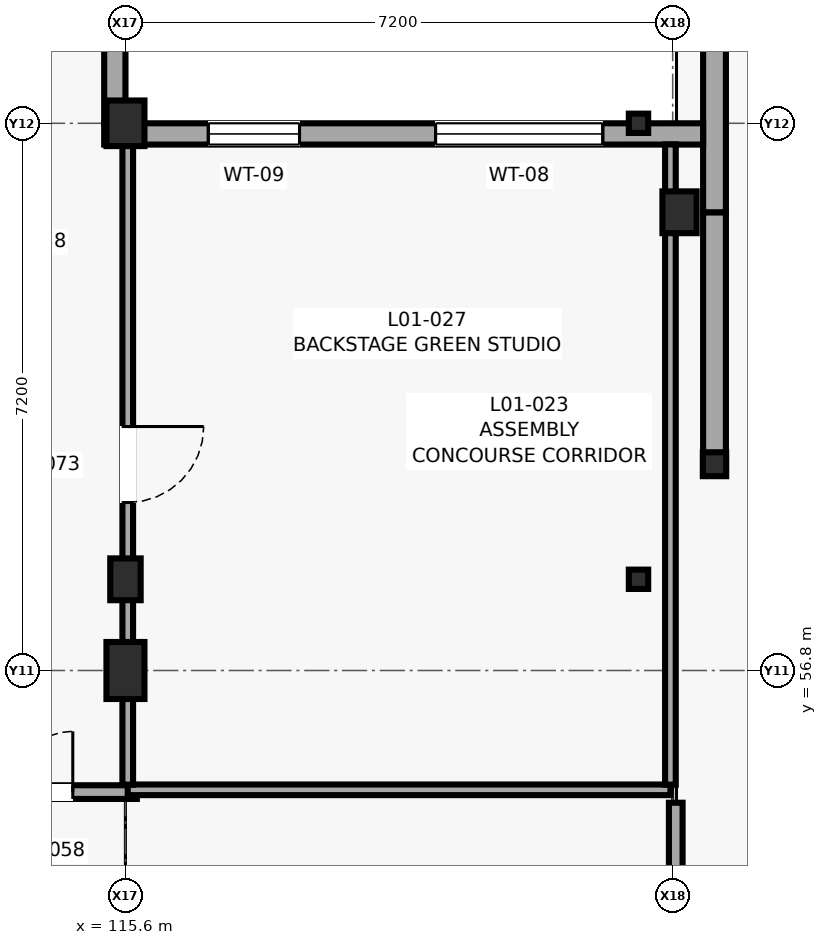
"""IFC4 building model, lengths in metres.
Left out: names, types, materials, properties, quantities, classifications, styles, units other than length and angle.
Written with IfcOpenShell. Run it as: python <this file> out.ifc"""

import sys

from ifc_helpers import new_model, si_unit, direction, frame, frame_2d, origin, origin_2d, place, context, subcontext, project, spatial, rectangle, i_section, extrude, element, fill, save


model = new_model("IFC4")
c1 = context("Model", 3, precision=1e-05, world=origin(), true_north=direction((0.0, 1.0)))
c2 = subcontext(c1, "Body", "Model", "MODEL_VIEW")
j1 = project(units=[si_unit("LENGTHUNIT", "METRE"), si_unit("PLANEANGLEUNIT", "RADIAN")], contexts=[c1])
p1 = place(None, origin())
s1 = spatial("IfcSite", under=j1, at=p1, CompositionType="ELEMENT")
p2 = place(p1, origin())
s2 = spatial("IfcBuilding", under=s1, at=p2, CompositionType="ELEMENT")
p3 = place(p2, frame((0.0, 0.0, 4.2)))
s3 = spatial("IfcBuildingStorey", under=s2, at=p3, CompositionType="ELEMENT", Elevation=4.2)
p4 = place(p3, frame((115.6, 56.8, 0.0), z_axis=(0.0, 0.0, 1.0), x_axis=(1.0, 0.0, 0.0)))
e1 = element("IfcColumn", 1, at=p4, inside=s3, PredefinedType="COLUMN", context=c2, shape_type="SweptSolid", body=[
    extrude(rectangle(XDim=0.5, YDim=0.75, at=origin_2d()), origin(), (0.0, 0.0, 1.0), 4.0),
])
p5 = place(p3, frame((115.6, 58.0, 0.0), z_axis=(0.0, 0.0, 1.0), x_axis=(1.0, 0.0, 0.0)))
e2 = element("IfcColumn", 2, at=p5, inside=s3, PredefinedType="COLUMN", context=c2, shape_type="SweptSolid", body=[
    extrude(rectangle(XDim=0.4, YDim=0.55, at=origin_2d()), origin(), (0.0, 0.0, 1.0), 4.0),
])
p6 = place(p3, frame((115.6, 64.0, 0.0), z_axis=(0.0, 0.0, 1.0), x_axis=(1.0, 0.0, 0.0)))
e3 = element("IfcColumn", 3, at=p6, inside=s3, PredefinedType="PILASTER", context=c2, shape_type="SweptSolid", body=[
    extrude(rectangle(XDim=0.5, YDim=0.6, at=origin_2d()), origin(), (0.0, 0.0, 1.0), 4.0),
])
for number, where, z_axis, x_axis in (
    (4, (122.35, 58.0, 0.0), (0.0, 0.0, 1.0), (1.0, 0.0, 0.0)),
    (5, (122.35, 64.0, 0.0), (0.0, 0.0, 1.0), (1.0, 0.0, 0.0)),
):
    element("IfcColumn", number, at=place(p3, frame(where, z_axis=z_axis, x_axis=x_axis)), inside=s3, PredefinedType="COLUMN", context=c2, shape_type="SweptSolid", body=[
        extrude(i_section(OverallWidth=0.255, OverallDepth=0.254, WebThickness=0.009, FlangeThickness=0.014, FilletRadius=0.013, at=origin_2d()), origin(), (0.0, 0.0, 1.0), 4.0),
    ])
p7 = place(p3, frame((122.89, 62.829, 0.0), z_axis=(0.0, 0.0, 1.0), x_axis=(1.0, 0.0, 0.0)))
e6 = element("IfcColumn", 6, at=p7, inside=s3, PredefinedType="PILASTER", context=c2, shape_type="SweptSolid", body=[
    extrude(rectangle(XDim=0.45, YDim=0.55, at=origin_2d()), origin(), (0.0, 0.0, 1.0), 4.0),
])
p8 = place(p3, frame((123.35, 59.514, 0.0), z_axis=(0.0, 0.0, 1.0), x_axis=(1.0, 0.0, 0.0)))
e7 = element("IfcColumn", 7, at=p8, inside=s3, PredefinedType="COLUMN", context=c2, shape_type="SweptSolid", body=[
    extrude(i_section(OverallWidth=0.307, OverallDepth=0.314, WebThickness=0.012, FlangeThickness=0.019, FilletRadius=0.015, at=origin_2d()), origin(), (0.0, 0.0, 1.0), 4.0),
])
p9 = place(p3, frame((123.35, 62.829, 0.0), z_axis=(0.0, 0.0, 1.0), x_axis=(0.0, -1.0, 0.0)))
e8 = element("IfcWall", 8, at=p9, inside=s3, PredefinedType="SOLIDWALL", context=c2, shape_type="SweptSolid", body=[
    extrude(rectangle(XDim=3.315, YDim=0.3, at=frame_2d((1.658, 0.0))), origin(), (0.0, 0.0, 1.0), 3.48),
])
p10 = place(p3, frame((123.35, 66.143, 0.0), z_axis=(0.0, 0.0, 1.0), x_axis=(0.0, -1.0, 0.0)))
e9 = element("IfcWall", 9, at=p10, inside=s3, PredefinedType="SOLIDWALL", context=c2, shape_type="SweptSolid", body=[
    extrude(rectangle(XDim=3.314, YDim=0.3, at=frame_2d((1.657, 0.0))), origin(), (0.0, 0.0, 1.0), 3.48),
])
p11 = place(p3, frame((123.2, 63.86, 0.0), z_axis=(0.0, 0.0, 1.0), x_axis=(-1.0, 0.0, 0.0)))
e10 = element("IfcWall", 10, at=p11, inside=s3, PredefinedType="SOLIDWALL", context=c2, shape_type="SweptSolid", body=[
    extrude(rectangle(XDim=7.88, YDim=0.28, at=frame_2d((3.94, 0.0))), origin(), (0.0, 0.0, 1.0), 3.16),
])
p12 = place(p11, frame((1.32, 0.0, 1.05)))
e11 = element("IfcOpeningElement", 11, at=p12, cuts=e10, PredefinedType="OPENING", context=c2, shape_type="SweptSolid", body=[
    extrude(rectangle(XDim=2.2, YDim=1.35, at=frame_2d((1.1, 0.675))), frame((0.0, 0.15, 0.0), z_axis=(0.0, -1.0, 0.0), x_axis=(1.0, 0.0, 0.0)), (0.0, 0.0, 1.0), 0.3),
])
p13 = place(p11, frame((5.31, 0.0, 1.05)))
e12 = element("IfcOpeningElement", 12, at=p13, cuts=e10, PredefinedType="OPENING", context=c2, shape_type="SweptSolid", body=[
    extrude(rectangle(XDim=1.2, YDim=0.9, at=frame_2d((0.6, 0.45))), frame((0.0, 0.15, 0.0), z_axis=(0.0, -1.0, 0.0), x_axis=(1.0, 0.0, 0.0)), (0.0, 0.0, 1.0), 0.3),
])
p14 = place(p3, frame((115.46, 64.0, 0.0), z_axis=(0.0, 0.0, 1.0), x_axis=(0.0, 1.0, 0.0)))
e13 = element("IfcWall", 13, at=p14, inside=s3, PredefinedType="SOLIDWALL", context=c2, shape_type="SweptSolid", body=[
    extrude(rectangle(XDim=7.6, YDim=0.28, at=frame_2d((3.8, 0.0))), origin(), (0.0, 0.0, 1.0), 3.275),
])
p15 = place(p14, frame((1.45, 0.0, 1.05)))
e14 = element("IfcOpeningElement", 14, at=p15, cuts=e13, PredefinedType="OPENING", context=c2, shape_type="SweptSolid", body=[
    extrude(rectangle(XDim=0.9, YDim=0.9, at=frame_2d((0.45, 0.45))), frame((0.0, 0.15, 0.0), z_axis=(0.0, -1.0, 0.0), x_axis=(1.0, 0.0, 0.0)), (0.0, 0.0, 1.0), 0.3),
])
p16 = place(p14, frame((5.475, 0.0, 1.05)))
e15 = element("IfcOpeningElement", 15, at=p16, cuts=e13, PredefinedType="OPENING", context=c2, shape_type="SweptSolid", body=[
    extrude(rectangle(XDim=1.35, YDim=1.2, at=frame_2d((0.675, 0.6))), frame((0.0, 0.15, 0.0), z_axis=(0.0, -1.0, 0.0), x_axis=(1.0, 0.0, 0.0)), (0.0, 0.0, 1.0), 0.3),
])
p17 = place(p3, frame((122.84, 50.678, 0.0), z_axis=(0.0, 0.0, 1.0), x_axis=(0.0, 1.0, 0.0)))
e16 = element("IfcWall", 16, at=p17, inside=s3, PredefinedType="PARTITIONING", context=c2, shape_type="SweptSolid", body=[
    extrude(rectangle(XDim=4.382, YDim=0.18, at=frame_2d((2.191, 0.0))), origin(), (0.0, 0.0, 1.0), 3.78),
])
p18 = place(p17, frame((0.9, 0.0, 0.0)))
e17 = element("IfcOpeningElement", 17, at=p18, cuts=e16, PredefinedType="OPENING", context=c2, shape_type="SweptSolid", body=[
    extrude(rectangle(XDim=1.6, YDim=2.25, at=frame_2d((0.8, 1.125))), frame((0.0, 0.1, 0.0), z_axis=(0.0, -1.0, 0.0), x_axis=(1.0, 0.0, 0.0)), (0.0, 0.0, 1.0), 0.2),
])
p19 = place(p3, frame((112.853, 55.2, 0.0), z_axis=(0.0, 0.0, 1.0), x_axis=(1.0, 0.0, 0.0)))
e18 = element("IfcWall", 18, at=p19, inside=s3, PredefinedType="PARTITIONING", context=c2, shape_type="SweptSolid", body=[
    extrude(rectangle(XDim=2.897, YDim=0.18, at=frame_2d((1.448, 0.0))), origin(), (0.0, 0.0, 1.0), 3.78),
])
p20 = place(p19, frame((0.454, 0.0, 0.0)))
e19 = element("IfcOpeningElement", 19, at=p20, cuts=e18, PredefinedType="OPENING", context=c2, shape_type="SweptSolid", body=[
    extrude(rectangle(XDim=1.6, YDim=2.25, at=frame_2d((0.8, 1.125))), frame((0.0, 0.1, 0.0), z_axis=(0.0, -1.0, 0.0), x_axis=(1.0, 0.0, 0.0)), (0.0, 0.0, 1.0), 0.2),
])
p21 = place(p3, frame((115.63, 55.23, 0.0), z_axis=(0.0, 0.0, 1.0), x_axis=(1.0, 0.0, 0.0)))
e20 = element("IfcWall", 20, at=p21, inside=s3, PredefinedType="PARTITIONING", context=c2, shape_type="SweptSolid", body=[
    extrude(rectangle(XDim=7.14, YDim=0.14, at=frame_2d((3.57, 0.0))), origin(), (0.0, 0.0, 1.0), 3.76),
])
p22 = place(p3, frame((122.77, 55.298, 0.0), z_axis=(0.0, 0.0, 1.0), x_axis=(0.0, 1.0, 0.0)))
e21 = element("IfcWall", 21, at=p22, inside=s3, PredefinedType="PARTITIONING", context=c2, shape_type="SweptSolid", body=[
    extrude(rectangle(XDim=8.424, YDim=0.14, at=frame_2d((4.212, 0.0))), origin(), (0.0, 0.0, 1.0), 3.76),
])
p23 = place(p3, frame((115.63, 63.722, 0.0), z_axis=(0.0, 0.0, 1.0), x_axis=(0.0, -1.0, 0.0)))
e22 = element("IfcWall", 22, at=p23, inside=s3, PredefinedType="PARTITIONING", context=c2, shape_type="SweptSolid", body=[
    extrude(rectangle(XDim=8.424, YDim=0.14, at=frame_2d((4.212, 0.0))), origin(), (0.0, 0.0, 1.0), 3.225),
])
p24 = place(p23, frame((3.712, 0.0, 0.0)))
e23 = element("IfcOpeningElement", 23, at=p24, cuts=e22, PredefinedType="OPENING", context=c2, shape_type="SweptSolid", body=[
    extrude(rectangle(XDim=1.0, YDim=2.1, at=frame_2d((0.5, 1.05))), frame((0.0, 0.08, 0.0), z_axis=(0.0, -1.0, 0.0), x_axis=(1.0, 0.0, 0.0)), (0.0, 0.0, 1.0), 0.16),
])
p25 = place(p12, origin())
e24 = element("IfcWindow", 24, at=p25, inside=s3, PartitioningType="SINGLE_PANEL", PredefinedType="WINDOW", context=c2, shape_type="SweptSolid", body=[
    extrude(rectangle(XDim=2.2, YDim=1.35, at=frame_2d((1.1, 0.675))), frame((0.0, 0.03, 0.0), z_axis=(0.0, -1.0, 0.0), x_axis=(1.0, 0.0, 0.0)), (0.0, 0.0, 1.0), 0.06),
])
fill(e11, e24)
p26 = place(p13, origin())
e25 = element("IfcWindow", 25, at=p26, inside=s3, PartitioningType="SINGLE_PANEL", PredefinedType="WINDOW", context=c2, shape_type="SweptSolid", body=[
    extrude(rectangle(XDim=1.2, YDim=0.9, at=frame_2d((0.6, 0.45))), frame((0.0, 0.03, 0.0), z_axis=(0.0, -1.0, 0.0), x_axis=(1.0, 0.0, 0.0)), (0.0, 0.0, 1.0), 0.06),
])
fill(e12, e25)
p27 = place(p20, origin())
e26 = element("IfcDoor", 26, at=p27, inside=s3, OperationType="DOUBLE_DOOR_SINGLE_SWING", PredefinedType="DOOR", context=c2, shape_type="SweptSolid", body=[
    extrude(rectangle(XDim=1.6, YDim=2.25, at=frame_2d((0.8, 1.125))), frame((0.0, 0.025, 0.0), z_axis=(0.0, -1.0, 0.0), x_axis=(1.0, 0.0, 0.0)), (0.0, 0.0, 1.0), 0.05),
])
fill(e19, e26)
p28 = place(p24, origin())
e27 = element("IfcDoor", 27, at=p28, inside=s3, OperationType="SINGLE_SWING_LEFT", PredefinedType="DOOR", context=c2, shape_type="SweptSolid", body=[
    extrude(rectangle(XDim=1.0, YDim=2.1, at=frame_2d((0.5, 1.05))), frame((0.0, 0.025, 0.0), z_axis=(0.0, -1.0, 0.0), x_axis=(1.0, 0.0, 0.0)), (0.0, 0.0, 1.0), 0.05),
])
fill(e23, e27)
save(model, sys.argv[1])
